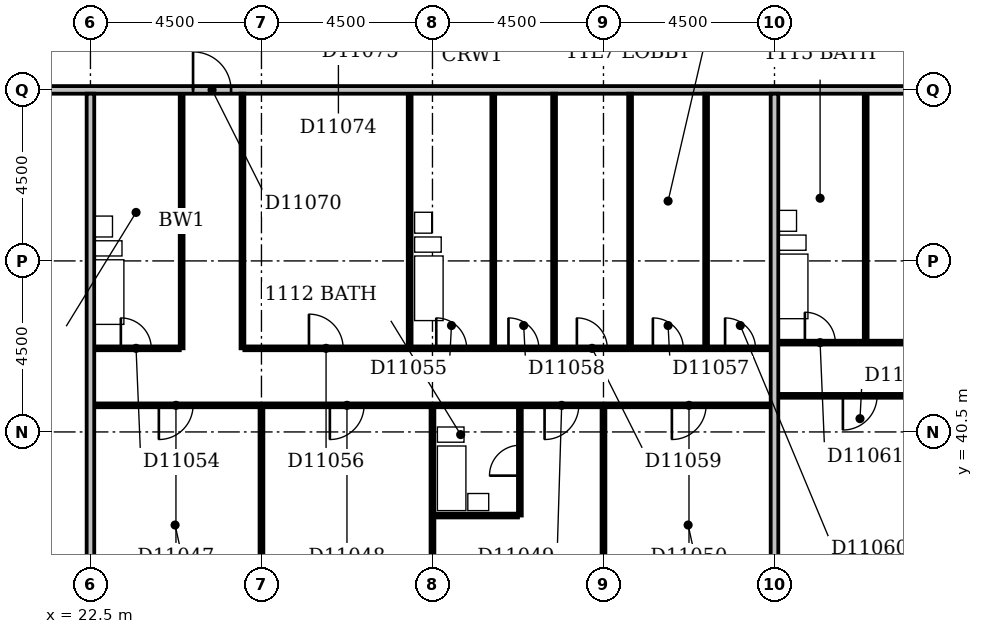
"""IFC4 building model, lengths in metres.
Left out: names, types, materials, properties, quantities, classifications, styles, units other than length and angle.
Written with IfcOpenShell. Run it as: python <this file> out.ifc"""

import sys

from ifc_helpers import new_model, si_unit, direction, frame, frame_2d, origin, place, context, subcontext, project, spatial, rectangle, extrude, element, fill, save


model = new_model("IFC4")
c1 = context("Model", 3, precision=1e-05, world=origin(), true_north=direction((0.0, 1.0)))
c2 = subcontext(c1, "Body", "Model", "MODEL_VIEW")
j1 = project(units=[si_unit("LENGTHUNIT", "METRE"), si_unit("PLANEANGLEUNIT", "RADIAN")], contexts=[c1])
p1 = place(None, origin())
s1 = spatial("IfcSite", under=j1, at=p1, CompositionType="ELEMENT")
p2 = place(p1, origin())
s2 = spatial("IfcBuilding", under=s1, at=p2, CompositionType="ELEMENT")
p3 = place(p2, frame((0.0, 0.0, 50.6)))
s3 = spatial("IfcBuildingStorey", under=s2, at=p3, CompositionType="ELEMENT", Elevation=50.6)
p4 = place(p3, frame((22.5, 36.6, 0.0), z_axis=(0.0, 0.0, 1.0), x_axis=(0.0, 1.0, 0.0)))
e1 = element("IfcWall", 1, at=p4, inside=s3, PredefinedType="PARTITIONING", context=c2, shape_type="SweptSolid", body=[
    extrude(rectangle(XDim=12.8, YDim=0.2, at=frame_2d((6.4, 0.0))), origin(), (0.0, 0.0, 1.0), 3.3),
])
p5 = place(p3, frame((27.0, 36.6, 0.0), z_axis=(0.0, 0.0, 1.0), x_axis=(0.0, 1.0, 0.0)))
e2 = element("IfcWall", 2, at=p5, inside=s3, PredefinedType="PARTITIONING", context=c2, shape_type="SweptSolid", body=[
    extrude(rectangle(XDim=4.55, YDim=0.1, at=frame_2d((2.275, 0.0))), origin(), (0.0, 0.0, 1.0), 2.6),
])
p6 = place(p3, frame((31.5, 36.6, 0.0), z_axis=(0.0, 0.0, 1.0), x_axis=(0.0, 1.0, 0.0)))
e3 = element("IfcWall", 3, at=p6, inside=s3, PredefinedType="PARTITIONING", context=c2, shape_type="SweptSolid", body=[
    extrude(rectangle(XDim=4.55, YDim=0.1, at=frame_2d((2.275, 0.0))), origin(), (0.0, 0.0, 1.0), 3.3),
])
p7 = place(p3, frame((36.0, 36.6, 0.0), z_axis=(0.0, 0.0, 1.0), x_axis=(0.0, 1.0, 0.0)))
e4 = element("IfcWall", 4, at=p7, inside=s3, PredefinedType="PARTITIONING", context=c2, shape_type="SweptSolid", body=[
    extrude(rectangle(XDim=4.55, YDim=0.1, at=frame_2d((2.275, 0.0))), origin(), (0.0, 0.0, 1.0), 2.4),
])
p8 = place(p3, frame((40.5, 36.6, 0.0), z_axis=(0.0, 0.0, 1.0), x_axis=(0.0, 1.0, 0.0)))
e5 = element("IfcWall", 5, at=p8, inside=s3, PredefinedType="PARTITIONING", context=c2, shape_type="SweptSolid", body=[
    extrude(rectangle(XDim=12.8, YDim=0.2, at=frame_2d((6.4, 0.0))), origin(), (0.0, 0.0, 1.0), 3.3),
])
p9 = place(p3, frame((31.55, 38.3, 0.0), z_axis=(0.0, 0.0, 1.0), x_axis=(1.0, 0.0, 0.0)))
e6 = element("IfcWall", 6, at=p9, inside=s3, PredefinedType="PLUMBINGWALL", context=c2, shape_type="SweptSolid", body=[
    extrude(rectangle(XDim=2.2, YDim=0.1, at=frame_2d((1.1, 0.0))), origin(), (0.0, 0.0, 1.0), 3.3),
])
p10 = place(p3, frame((33.8, 38.3, 0.0), z_axis=(0.0, 0.0, 1.0), x_axis=(0.0, 1.0, 0.0)))
e7 = element("IfcWall", 7, at=p10, inside=s3, PredefinedType="PLUMBINGWALL", context=c2, shape_type="SweptSolid", body=[
    extrude(rectangle(XDim=2.85, YDim=0.1, at=frame_2d((1.425, 0.0))), origin(), (0.0, 0.0, 1.0), 3.3),
])
p11 = place(p10, frame((1.05, 0.0, 0.0)))
e8 = element("IfcOpeningElement", 8, at=p11, cuts=e7, PredefinedType="OPENING", context=c2, shape_type="SweptSolid", body=[
    extrude(rectangle(XDim=0.8, YDim=2.1, at=frame_2d((0.4, 1.05))), frame((0.0, 0.062, 0.0), z_axis=(0.0, -1.0, 0.0), x_axis=(1.0, 0.0, 0.0)), (0.0, 0.0, 1.0), 0.124),
])
p12 = place(p3, frame((22.6, 41.2, 0.0), z_axis=(0.0, 0.0, 1.0), x_axis=(1.0, 0.0, 0.0)))
e9 = element("IfcWall", 9, at=p12, inside=s3, PredefinedType="PARTITIONING", context=c2, shape_type="SweptSolid", body=[
    extrude(rectangle(XDim=17.8, YDim=0.1, at=frame_2d((8.9, 0.0))), origin(), (0.0, 0.0, 1.0), 3.3),
])
p13 = place(p12, frame((1.7, 0.0, 0.0)))
e10 = element("IfcOpeningElement", 10, at=p13, cuts=e9, PredefinedType="OPENING", context=c2, shape_type="SweptSolid", body=[
    extrude(rectangle(XDim=0.9, YDim=2.1, at=frame_2d((0.45, 1.05))), frame((0.0, 0.062, 0.0), z_axis=(0.0, -1.0, 0.0), x_axis=(1.0, 0.0, 0.0)), (0.0, 0.0, 1.0), 0.124),
])
p14 = place(p12, frame((6.2, 0.0, 0.0)))
e11 = element("IfcOpeningElement", 11, at=p14, cuts=e9, PredefinedType="OPENING", context=c2, shape_type="SweptSolid", body=[
    extrude(rectangle(XDim=0.9, YDim=2.1, at=frame_2d((0.45, 1.05))), frame((0.0, 0.062, 0.0), z_axis=(0.0, -1.0, 0.0), x_axis=(1.0, 0.0, 0.0)), (0.0, 0.0, 1.0), 0.124),
])
p15 = place(p12, frame((11.85, 0.0, 0.0)))
e12 = element("IfcOpeningElement", 12, at=p15, cuts=e9, PredefinedType="OPENING", context=c2, shape_type="SweptSolid", body=[
    extrude(rectangle(XDim=0.9, YDim=2.1, at=frame_2d((0.45, 1.05))), frame((0.0, 0.062, 0.0), z_axis=(0.0, -1.0, 0.0), x_axis=(1.0, 0.0, 0.0)), (0.0, 0.0, 1.0), 0.124),
])
p16 = place(p12, frame((15.2, 0.0, 0.0)))
e13 = element("IfcOpeningElement", 13, at=p16, cuts=e9, PredefinedType="OPENING", context=c2, shape_type="SweptSolid", body=[
    extrude(rectangle(XDim=0.9, YDim=2.1, at=frame_2d((0.45, 1.05))), frame((0.0, 0.062, 0.0), z_axis=(0.0, -1.0, 0.0), x_axis=(1.0, 0.0, 0.0)), (0.0, 0.0, 1.0), 0.124),
])
p17 = place(p3, frame((40.6, 41.45, 0.0), z_axis=(0.0, 0.0, 1.0), x_axis=(1.0, 0.0, 0.0)))
e14 = element("IfcWall", 14, at=p17, inside=s3, PredefinedType="PARTITIONING", context=c2, shape_type="SweptSolid", body=[
    extrude(rectangle(XDim=13.3, YDim=0.1, at=frame_2d((6.65, 0.0))), origin(), (0.0, 0.0, 1.0), 3.3),
])
p18 = place(p17, frame((1.7, 0.0, 0.0)))
e15 = element("IfcOpeningElement", 15, at=p18, cuts=e14, PredefinedType="OPENING", context=c2, shape_type="SweptSolid", body=[
    extrude(rectangle(XDim=0.9, YDim=2.1, at=frame_2d((0.45, 1.05))), frame((0.0, 0.062, 0.0), z_axis=(0.0, -1.0, 0.0), x_axis=(1.0, 0.0, 0.0)), (0.0, 0.0, 1.0), 0.124),
])
p19 = place(p17, frame((6.2, 0.0, 0.0)))
e16 = element("IfcOpeningElement", 16, at=p19, cuts=e14, PredefinedType="OPENING", context=c2, shape_type="SweptSolid", body=[
    extrude(rectangle(XDim=0.9, YDim=2.1, at=frame_2d((0.45, 1.05))), frame((0.0, 0.062, 0.0), z_axis=(0.0, -1.0, 0.0), x_axis=(1.0, 0.0, 0.0)), (0.0, 0.0, 1.0), 0.124),
])
p20 = place(p17, frame((10.7, 0.0, 0.0)))
e17 = element("IfcOpeningElement", 17, at=p20, cuts=e14, PredefinedType="OPENING", context=c2, shape_type="SweptSolid", body=[
    extrude(rectangle(XDim=0.9, YDim=2.1, at=frame_2d((0.45, 1.05))), frame((0.0, 0.062, 0.0), z_axis=(0.0, -1.0, 0.0), x_axis=(1.0, 0.0, 0.0)), (0.0, 0.0, 1.0), 0.124),
])
p21 = place(p3, frame((22.6, 42.7, 0.0), z_axis=(0.0, 0.0, 1.0), x_axis=(1.0, 0.0, 0.0)))
e18 = element("IfcWall", 18, at=p21, inside=s3, PredefinedType="PARTITIONING", context=c2, shape_type="SweptSolid", body=[
    extrude(rectangle(XDim=2.25, YDim=0.1, at=frame_2d((1.125, 0.0))), origin(), (0.0, 0.0, 1.0), 3.3),
])
p22 = place(p21, frame((0.7, 0.0, 0.0)))
e19 = element("IfcOpeningElement", 19, at=p22, cuts=e18, PredefinedType="OPENING", context=c2, shape_type="SweptSolid", body=[
    extrude(rectangle(XDim=0.8, YDim=2.1, at=frame_2d((0.4, 1.05))), frame((0.0, 0.062, 0.0), z_axis=(0.0, -1.0, 0.0), x_axis=(1.0, 0.0, 0.0)), (0.0, 0.0, 1.0), 0.124),
])
p23 = place(p3, frame((24.9, 42.7, 0.0), z_axis=(0.0, 0.0, 1.0), x_axis=(0.0, 1.0, 0.0)))
e20 = element("IfcWall", 20, at=p23, inside=s3, PredefinedType="PLUMBINGWALL", context=c2, shape_type="SweptSolid", body=[
    extrude(rectangle(XDim=6.7, YDim=0.1, at=frame_2d((3.35, 0.0))), origin(), (0.0, 0.0, 1.0), 3.3),
])
p24 = place(p3, frame((26.5, 42.7, 0.0), z_axis=(0.0, 0.0, 1.0), x_axis=(0.0, 1.0, 0.0)))
e21 = element("IfcWall", 21, at=p24, inside=s3, PredefinedType="PARTITIONING", context=c2, shape_type="SweptSolid", body=[
    extrude(rectangle(XDim=6.7, YDim=0.1, at=frame_2d((3.35, 0.0))), origin(), (0.0, 0.0, 1.0), 2.6),
])
p25 = place(p3, frame((26.55, 42.7, 0.0), z_axis=(0.0, 0.0, 1.0), x_axis=(1.0, 0.0, 0.0)))
e22 = element("IfcWall", 22, at=p25, inside=s3, PredefinedType="PARTITIONING", context=c2, shape_type="SweptSolid", body=[
    extrude(rectangle(XDim=13.85, YDim=0.1, at=frame_2d((6.925, 0.0))), origin(), (0.0, 0.0, 1.0), 3.3),
])
p26 = place(p25, frame((5.05, 0.0, 0.0)))
e23 = element("IfcOpeningElement", 23, at=p26, cuts=e22, PredefinedType="OPENING", context=c2, shape_type="SweptSolid", body=[
    extrude(rectangle(XDim=0.8, YDim=2.1, at=frame_2d((0.4, 1.05))), frame((0.0, 0.062, 0.0), z_axis=(0.0, -1.0, 0.0), x_axis=(1.0, 0.0, 0.0)), (0.0, 0.0, 1.0), 0.124),
])
p27 = place(p25, frame((1.7, 0.0, 0.0)))
e24 = element("IfcOpeningElement", 24, at=p27, cuts=e22, PredefinedType="OPENING", context=c2, shape_type="SweptSolid", body=[
    extrude(rectangle(XDim=0.9, YDim=2.1, at=frame_2d((0.45, 1.05))), frame((0.0, 0.062, 0.0), z_axis=(0.0, -1.0, 0.0), x_axis=(1.0, 0.0, 0.0)), (0.0, 0.0, 1.0), 0.124),
])
p28 = place(p25, frame((10.75, 0.0, 0.0)))
e25 = element("IfcOpeningElement", 25, at=p28, cuts=e22, PredefinedType="OPENING", context=c2, shape_type="SweptSolid", body=[
    extrude(rectangle(XDim=0.8, YDim=2.1, at=frame_2d((0.4, 1.05))), frame((0.0, 0.062, 0.0), z_axis=(0.0, -1.0, 0.0), x_axis=(1.0, 0.0, 0.0)), (0.0, 0.0, 1.0), 0.124),
])
p29 = place(p25, frame((6.95, 0.0, 0.0)))
e26 = element("IfcOpeningElement", 26, at=p29, cuts=e22, PredefinedType="OPENING", context=c2, shape_type="SweptSolid", body=[
    extrude(rectangle(XDim=0.8, YDim=2.1, at=frame_2d((0.4, 1.05))), frame((0.0, 0.062, 0.0), z_axis=(0.0, -1.0, 0.0), x_axis=(1.0, 0.0, 0.0)), (0.0, 0.0, 1.0), 0.124),
])
p30 = place(p25, frame((8.75, 0.0, 0.0)))
e27 = element("IfcOpeningElement", 27, at=p30, cuts=e22, PredefinedType="OPENING", context=c2, shape_type="SweptSolid", body=[
    extrude(rectangle(XDim=0.8, YDim=2.1, at=frame_2d((0.4, 1.05))), frame((0.0, 0.062, 0.0), z_axis=(0.0, -1.0, 0.0), x_axis=(1.0, 0.0, 0.0)), (0.0, 0.0, 1.0), 0.124),
])
p31 = place(p25, frame((12.65, 0.0, 0.0)))
e28 = element("IfcOpeningElement", 28, at=p31, cuts=e22, PredefinedType="OPENING", context=c2, shape_type="SweptSolid", body=[
    extrude(rectangle(XDim=0.8, YDim=2.1, at=frame_2d((0.4, 1.05))), frame((0.0, 0.062, 0.0), z_axis=(0.0, -1.0, 0.0), x_axis=(1.0, 0.0, 0.0)), (0.0, 0.0, 1.0), 0.124),
])
for number, where, z_axis, x_axis in (
    (29, (30.9, 42.75, 0.0), (0.0, 0.0, 1.0), (0.0, 1.0, 0.0)),
    (30, (33.1, 42.75, 0.0), (0.0, 0.0, 1.0), (0.0, 1.0, 0.0)),
):
    element("IfcWall", number, at=place(p3, frame(where, z_axis=z_axis, x_axis=x_axis)), inside=s3, PredefinedType="PLUMBINGWALL", context=c2, shape_type="SweptSolid", body=[
        extrude(rectangle(XDim=6.65, YDim=0.1, at=frame_2d((3.325, 0.0))), origin(), (0.0, 0.0, 1.0), 3.3),
    ])
p32 = place(p3, frame((34.7, 42.75, 0.0), z_axis=(0.0, 0.0, 1.0), x_axis=(0.0, 1.0, 0.0)))
e31 = element("IfcWall", 31, at=p32, inside=s3, PredefinedType="PARTITIONING", context=c2, shape_type="SweptSolid", body=[
    extrude(rectangle(XDim=6.65, YDim=0.1, at=frame_2d((3.325, 0.0))), origin(), (0.0, 0.0, 1.0), 3.3),
])
p33 = place(p3, frame((36.7, 42.75, 0.0), z_axis=(0.0, 0.0, 1.0), x_axis=(0.0, 1.0, 0.0)))
e32 = element("IfcWall", 32, at=p33, inside=s3, PredefinedType="PARTITIONING", context=c2, shape_type="SweptSolid", body=[
    extrude(rectangle(XDim=6.65, YDim=0.1, at=frame_2d((3.325, 0.0))), origin(), (0.0, 0.0, 1.0), 2.4),
])
p34 = place(p3, frame((38.7, 42.75, 0.0), z_axis=(0.0, 0.0, 1.0), x_axis=(0.0, 1.0, 0.0)))
e33 = element("IfcWall", 33, at=p34, inside=s3, PredefinedType="PARTITIONING", context=c2, shape_type="SweptSolid", body=[
    extrude(rectangle(XDim=6.65, YDim=0.1, at=frame_2d((3.325, 0.0))), origin(), (0.0, 0.0, 1.0), 3.3),
])
p35 = place(p3, frame((40.6, 42.85, 0.0), z_axis=(0.0, 0.0, 1.0), x_axis=(1.0, 0.0, 0.0)))
e34 = element("IfcWall", 34, at=p35, inside=s3, PredefinedType="PARTITIONING", context=c2, shape_type="SweptSolid", body=[
    extrude(rectangle(XDim=8.15, YDim=0.1, at=frame_2d((4.075, 0.0))), origin(), (0.0, 0.0, 1.0), 3.3),
])
p36 = place(p35, frame((0.7, 0.0, 0.0)))
e35 = element("IfcOpeningElement", 35, at=p36, cuts=e34, PredefinedType="OPENING", context=c2, shape_type="SweptSolid", body=[
    extrude(rectangle(XDim=0.8, YDim=2.1, at=frame_2d((0.4, 1.05))), frame((0.0, 0.062, 0.0), z_axis=(0.0, -1.0, 0.0), x_axis=(1.0, 0.0, 0.0)), (0.0, 0.0, 1.0), 0.124),
])
p37 = place(p35, frame((4.8, 0.0, 0.0)))
e36 = element("IfcOpeningElement", 36, at=p37, cuts=e34, PredefinedType="OPENING", context=c2, shape_type="SweptSolid", body=[
    extrude(rectangle(XDim=0.9, YDim=2.1, at=frame_2d((0.45, 1.05))), frame((0.0, 0.062, 0.0), z_axis=(0.0, -1.0, 0.0), x_axis=(1.0, 0.0, 0.0)), (0.0, 0.0, 1.0), 0.124),
])
p38 = place(p3, frame((42.9, 42.9, 0.0), z_axis=(0.0, 0.0, 1.0), x_axis=(0.0, 1.0, 0.0)))
e37 = element("IfcWall", 37, at=p38, inside=s3, PredefinedType="PLUMBINGWALL", context=c2, shape_type="SweptSolid", body=[
    extrude(rectangle(XDim=6.5, YDim=0.1, at=frame_2d((3.25, 0.0))), origin(), (0.0, 0.0, 1.0), 3.3),
])
p39 = place(p3, frame((9.1, 49.5, 0.0), z_axis=(0.0, 0.0, 1.0), x_axis=(1.0, 0.0, 0.0)))
e38 = element("IfcWall", 38, at=p39, inside=s3, PredefinedType="PARTITIONING", context=c2, shape_type="SweptSolid", body=[
    extrude(rectangle(XDim=57.8, YDim=0.2, at=frame_2d((28.9, 0.0))), origin(), (0.0, 0.0, 1.0), 3.3),
])
p40 = place(p39, frame((16.1, 0.0, 0.0)))
e39 = element("IfcOpeningElement", 39, at=p40, cuts=e38, PredefinedType="OPENING", context=c2, shape_type="SweptSolid", body=[
    extrude(rectangle(XDim=1.0, YDim=2.1, at=frame_2d((0.5, 1.05))), frame((0.0, 0.112, 0.0), z_axis=(0.0, -1.0, 0.0), x_axis=(1.0, 0.0, 0.0)), (0.0, 0.0, 1.0), 0.224),
])
p41 = place(p39, frame((40.0, 0.0, 0.0)))
e40 = element("IfcOpeningElement", 40, at=p41, cuts=e38, PredefinedType="OPENING", context=c2, shape_type="SweptSolid", body=[
    extrude(rectangle(XDim=1.0, YDim=2.1, at=frame_2d((0.5, 1.05))), frame((0.0, 0.112, 0.0), z_axis=(0.0, -1.0, 0.0), x_axis=(1.0, 0.0, 0.0)), (0.0, 0.0, 1.0), 0.224),
])
p42 = place(p39, frame((45.2, 0.0, 0.0)))
e41 = element("IfcOpeningElement", 41, at=p42, cuts=e38, PredefinedType="OPENING", context=c2, shape_type="SweptSolid", body=[
    extrude(rectangle(XDim=1.0, YDim=2.1, at=frame_2d((0.5, 1.05))), frame((0.0, 0.112, 0.0), z_axis=(0.0, -1.0, 0.0), x_axis=(1.0, 0.0, 0.0)), (0.0, 0.0, 1.0), 0.224),
])
p43 = place(p39, frame((3.9, 0.0, 0.0)))
e42 = element("IfcOpeningElement", 42, at=p43, cuts=e38, PredefinedType="OPENING", context=c2, shape_type="SweptSolid", body=[
    extrude(rectangle(XDim=0.9, YDim=2.1, at=frame_2d((0.45, 1.05))), frame((0.0, 0.112, 0.0), z_axis=(0.0, -1.0, 0.0), x_axis=(1.0, 0.0, 0.0)), (0.0, 0.0, 1.0), 0.224),
])
p44 = place(p11, origin())
e43 = element("IfcDoor", 43, at=p44, inside=s3, OperationType="SINGLE_SWING_LEFT", PredefinedType="DOOR", context=c2, shape_type="SweptSolid", body=[
    extrude(rectangle(XDim=0.8, YDim=2.1, at=frame_2d((0.4, 1.05))), frame((0.0, 0.025, 0.0), z_axis=(0.0, -1.0, 0.0), x_axis=(1.0, 0.0, 0.0)), (0.0, 0.0, 1.0), 0.05),
])
fill(e8, e43)
p45 = place(p13, frame((0.9, 0.0, 0.0), z_axis=(0.0, 0.0, 1.0), x_axis=(-1.0, 0.0, 0.0)))
e44 = element("IfcDoor", 44, at=p45, inside=s3, OperationType="SINGLE_SWING_RIGHT", PredefinedType="DOOR", context=c2, shape_type="SweptSolid", body=[
    extrude(rectangle(XDim=0.9, YDim=2.1, at=frame_2d((0.45, 1.05))), frame((0.0, 0.025, 0.0), z_axis=(0.0, -1.0, 0.0), x_axis=(1.0, 0.0, 0.0)), (0.0, 0.0, 1.0), 0.05),
])
fill(e10, e44)
p46 = place(p14, frame((0.9, 0.0, 0.0), z_axis=(0.0, 0.0, 1.0), x_axis=(-1.0, 0.0, 0.0)))
e45 = element("IfcDoor", 45, at=p46, inside=s3, OperationType="SINGLE_SWING_RIGHT", PredefinedType="DOOR", context=c2, shape_type="SweptSolid", body=[
    extrude(rectangle(XDim=0.9, YDim=2.1, at=frame_2d((0.45, 1.05))), frame((0.0, 0.025, 0.0), z_axis=(0.0, -1.0, 0.0), x_axis=(1.0, 0.0, 0.0)), (0.0, 0.0, 1.0), 0.05),
])
fill(e11, e45)
p47 = place(p15, frame((0.9, 0.0, 0.0), z_axis=(0.0, 0.0, 1.0), x_axis=(-1.0, 0.0, 0.0)))
e46 = element("IfcDoor", 46, at=p47, inside=s3, OperationType="SINGLE_SWING_RIGHT", PredefinedType="DOOR", context=c2, shape_type="SweptSolid", body=[
    extrude(rectangle(XDim=0.9, YDim=2.1, at=frame_2d((0.45, 1.05))), frame((0.0, 0.025, 0.0), z_axis=(0.0, -1.0, 0.0), x_axis=(1.0, 0.0, 0.0)), (0.0, 0.0, 1.0), 0.05),
])
fill(e12, e46)
p48 = place(p16, frame((0.9, 0.0, 0.0), z_axis=(0.0, 0.0, 1.0), x_axis=(-1.0, 0.0, 0.0)))
e47 = element("IfcDoor", 47, at=p48, inside=s3, OperationType="SINGLE_SWING_RIGHT", PredefinedType="DOOR", context=c2, shape_type="SweptSolid", body=[
    extrude(rectangle(XDim=0.9, YDim=2.1, at=frame_2d((0.45, 1.05))), frame((0.0, 0.025, 0.0), z_axis=(0.0, -1.0, 0.0), x_axis=(1.0, 0.0, 0.0)), (0.0, 0.0, 1.0), 0.05),
])
fill(e13, e47)
p49 = place(p18, frame((0.9, 0.0, 0.0), z_axis=(0.0, 0.0, 1.0), x_axis=(-1.0, 0.0, 0.0)))
e48 = element("IfcDoor", 48, at=p49, inside=s3, OperationType="SINGLE_SWING_RIGHT", PredefinedType="DOOR", context=c2, shape_type="SweptSolid", body=[
    extrude(rectangle(XDim=0.9, YDim=2.1, at=frame_2d((0.45, 1.05))), frame((0.0, 0.025, 0.0), z_axis=(0.0, -1.0, 0.0), x_axis=(1.0, 0.0, 0.0)), (0.0, 0.0, 1.0), 0.05),
])
fill(e15, e48)
p50 = place(p22, origin())
e49 = element("IfcDoor", 49, at=p50, inside=s3, OperationType="SINGLE_SWING_LEFT", PredefinedType="DOOR", context=c2, shape_type="SweptSolid", body=[
    extrude(rectangle(XDim=0.8, YDim=2.1, at=frame_2d((0.4, 1.05))), frame((0.0, 0.025, 0.0), z_axis=(0.0, -1.0, 0.0), x_axis=(1.0, 0.0, 0.0)), (0.0, 0.0, 1.0), 0.05),
])
fill(e19, e49)
p51 = place(p26, origin())
e50 = element("IfcDoor", 50, at=p51, inside=s3, OperationType="SINGLE_SWING_LEFT", PredefinedType="DOOR", context=c2, shape_type="SweptSolid", body=[
    extrude(rectangle(XDim=0.8, YDim=2.1, at=frame_2d((0.4, 1.05))), frame((0.0, 0.025, 0.0), z_axis=(0.0, -1.0, 0.0), x_axis=(1.0, 0.0, 0.0)), (0.0, 0.0, 1.0), 0.05),
])
fill(e23, e50)
p52 = place(p27, origin())
e51 = element("IfcDoor", 51, at=p52, inside=s3, OperationType="SINGLE_SWING_LEFT", PredefinedType="DOOR", context=c2, shape_type="SweptSolid", body=[
    extrude(rectangle(XDim=0.9, YDim=2.1, at=frame_2d((0.45, 1.05))), frame((0.0, 0.025, 0.0), z_axis=(0.0, -1.0, 0.0), x_axis=(1.0, 0.0, 0.0)), (0.0, 0.0, 1.0), 0.05),
])
fill(e24, e51)
p53 = place(p28, origin())
e52 = element("IfcDoor", 52, at=p53, inside=s3, OperationType="SINGLE_SWING_LEFT", PredefinedType="DOOR", context=c2, shape_type="SweptSolid", body=[
    extrude(rectangle(XDim=0.8, YDim=2.1, at=frame_2d((0.4, 1.05))), frame((0.0, 0.025, 0.0), z_axis=(0.0, -1.0, 0.0), x_axis=(1.0, 0.0, 0.0)), (0.0, 0.0, 1.0), 0.05),
])
fill(e25, e52)
p54 = place(p29, origin())
e53 = element("IfcDoor", 53, at=p54, inside=s3, OperationType="SINGLE_SWING_LEFT", PredefinedType="DOOR", context=c2, shape_type="SweptSolid", body=[
    extrude(rectangle(XDim=0.8, YDim=2.1, at=frame_2d((0.4, 1.05))), frame((0.0, 0.025, 0.0), z_axis=(0.0, -1.0, 0.0), x_axis=(1.0, 0.0, 0.0)), (0.0, 0.0, 1.0), 0.05),
])
fill(e26, e53)
p55 = place(p30, origin())
e54 = element("IfcDoor", 54, at=p55, inside=s3, OperationType="SINGLE_SWING_LEFT", PredefinedType="DOOR", context=c2, shape_type="SweptSolid", body=[
    extrude(rectangle(XDim=0.8, YDim=2.1, at=frame_2d((0.4, 1.05))), frame((0.0, 0.025, 0.0), z_axis=(0.0, -1.0, 0.0), x_axis=(1.0, 0.0, 0.0)), (0.0, 0.0, 1.0), 0.05),
])
fill(e27, e54)
p56 = place(p31, origin())
e55 = element("IfcDoor", 55, at=p56, inside=s3, OperationType="SINGLE_SWING_LEFT", PredefinedType="DOOR", context=c2, shape_type="SweptSolid", body=[
    extrude(rectangle(XDim=0.8, YDim=2.1, at=frame_2d((0.4, 1.05))), frame((0.0, 0.025, 0.0), z_axis=(0.0, -1.0, 0.0), x_axis=(1.0, 0.0, 0.0)), (0.0, 0.0, 1.0), 0.05),
])
fill(e28, e55)
p57 = place(p36, origin())
e56 = element("IfcDoor", 56, at=p57, inside=s3, OperationType="SINGLE_SWING_LEFT", PredefinedType="DOOR", context=c2, shape_type="SweptSolid", body=[
    extrude(rectangle(XDim=0.8, YDim=2.1, at=frame_2d((0.4, 1.05))), frame((0.0, 0.025, 0.0), z_axis=(0.0, -1.0, 0.0), x_axis=(1.0, 0.0, 0.0)), (0.0, 0.0, 1.0), 0.05),
])
fill(e35, e56)
p58 = place(p40, origin())
e57 = element("IfcDoor", 57, at=p58, inside=s3, OperationType="SINGLE_SWING_LEFT", PredefinedType="DOOR", context=c2, shape_type="SweptSolid", body=[
    extrude(rectangle(XDim=1.0, YDim=2.1, at=frame_2d((0.5, 1.05))), frame((0.0, 0.025, 0.0), z_axis=(0.0, -1.0, 0.0), x_axis=(1.0, 0.0, 0.0)), (0.0, 0.0, 1.0), 0.05),
])
fill(e39, e57)
save(model, sys.argv[1])
